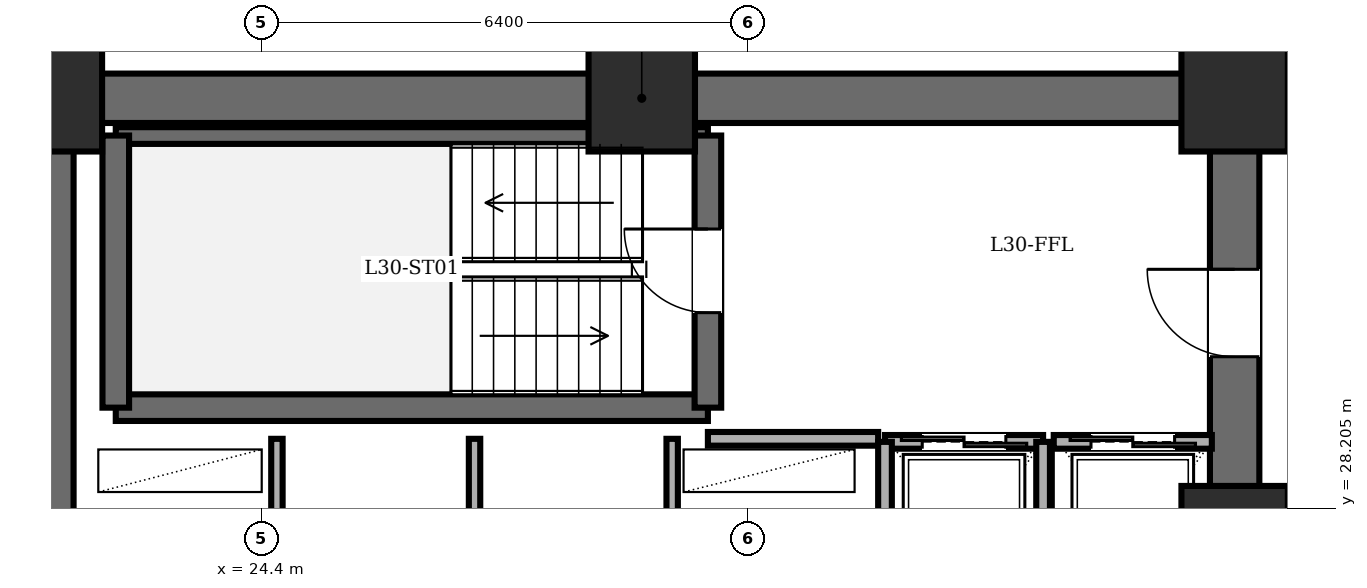
"""IFC4 building model, lengths in metres.
Left out: names, types, materials, properties, quantities, classifications, styles, units other than length and angle.
Written with IfcOpenShell. Run it as: python <this file> out.ifc"""

import sys

from ifc_helpers import new_model, si_unit, direction, frame, frame_2d, origin, origin_2d, place, context, subcontext, project, spatial, rectangle, extrude, element, fill, save


model = new_model("IFC4")
c1 = context("Model", 3, precision=1e-05, world=origin(), true_north=direction((0.0, 1.0)))
c2 = subcontext(c1, "Body", "Model", "MODEL_VIEW")
j1 = project(units=[si_unit("LENGTHUNIT", "METRE"), si_unit("PLANEANGLEUNIT", "RADIAN")], contexts=[c1])
p1 = place(None, origin())
s1 = spatial("IfcSite", under=j1, at=p1, CompositionType="ELEMENT")
p2 = place(p1, origin())
s2 = spatial("IfcBuilding", under=s1, at=p2, CompositionType="ELEMENT")
p3 = place(p2, frame((0.0, 0.0, 115.1)))
s3 = spatial("IfcBuildingStorey", under=s2, at=p3, CompositionType="ELEMENT", Elevation=115.1)
for number, where, z_axis, x_axis in (
    (1, (37.2, 27.8, 0.0), (0.0, 0.0, 1.0), (1.0, 0.0, 0.0)),
    (2, (37.2, 33.6, 0.0), (0.0, 0.0, 1.0), (1.0, 0.0, 0.0)),
    (3, (29.4, 33.6, 0.0), (0.0, 0.0, 1.0), (1.0, 0.0, 0.0)),
    (4, (21.6, 33.6, 0.0), (0.0, 0.0, 1.0), (1.0, 0.0, 0.0)),
):
    element("IfcColumn", number, at=place(p3, frame(where, z_axis=z_axis, x_axis=x_axis)), inside=s3, PredefinedType="COLUMN", context=c2, shape_type="SweptSolid", body=[
        extrude(rectangle(XDim=1.4, YDim=1.4, at=origin_2d()), origin(), (0.0, 0.0, 1.0), 3.6),
    ])
p4 = place(p3, frame((21.6, 14.4, 0.0), z_axis=(0.0, 0.0, 1.0), x_axis=(0.0, 1.0, 0.0)))
e5 = element("IfcWall", 5, at=p4, inside=s3, PredefinedType="SHEAR", context=c2, shape_type="SweptSolid", body=[
    extrude(rectangle(XDim=19.2, YDim=0.65, at=frame_2d((9.6, 0.0))), origin(), (0.0, 0.0, 1.0), 3.4),
])
p5 = place(p3, frame((21.6, 33.6, 0.0), z_axis=(0.0, 0.0, 1.0), x_axis=(1.0, 0.0, 0.0)))
e6 = element("IfcWall", 6, at=p5, inside=s3, PredefinedType="SHEAR", context=c2, shape_type="SweptSolid", body=[
    extrude(rectangle(XDim=15.6, YDim=0.65, at=frame_2d((7.8, 0.0))), origin(), (0.0, 0.0, 1.0), 3.4),
])
p6 = place(p3, frame((37.2, 14.4, 0.0), z_axis=(0.0, 0.0, 1.0), x_axis=(0.0, 1.0, 0.0)))
e7 = element("IfcWall", 7, at=p6, inside=s3, PredefinedType="SHEAR", context=c2, shape_type="SweptSolid", body=[
    extrude(rectangle(XDim=19.2, YDim=0.65, at=frame_2d((9.6, 0.0))), origin(), (0.0, 0.0, 1.0), 3.4),
])
p7 = place(p6, frame((15.8, 0.0, 0.0)))
e8 = element("IfcOpeningElement", 8, at=p7, cuts=e7, PredefinedType="OPENING", context=c2, shape_type="SweptSolid", body=[
    extrude(rectangle(XDim=1.15, YDim=2.15, at=frame_2d((0.575, 1.075))), frame((0.0, 0.335, 0.0), z_axis=(0.0, -1.0, 0.0), x_axis=(1.0, 0.0, 0.0)), (0.0, 0.0, 1.0), 0.67),
])
p8 = place(p6, frame((3.6, 0.0, 0.0)))
e9 = element("IfcOpeningElement", 9, at=p8, cuts=e7, PredefinedType="OPENING", context=c2, shape_type="SweptSolid", body=[
    extrude(rectangle(XDim=1.1, YDim=2.15, at=frame_2d((0.55, 1.075))), frame((0.0, 0.335, 0.0), z_axis=(0.0, -1.0, 0.0), x_axis=(1.0, 0.0, 0.0)), (0.0, 0.0, 1.0), 0.67),
])
p9 = place(p6, frame((8.6, 0.0, 0.0)))
e10 = element("IfcOpeningElement", 10, at=p9, cuts=e7, PredefinedType="OPENING", context=c2, shape_type="SweptSolid", body=[
    extrude(rectangle(XDim=1.3, YDim=2.2, at=frame_2d((0.65, 1.1))), frame((0.0, 0.335, 0.0), z_axis=(0.0, -1.0, 0.0), x_axis=(1.0, 0.0, 0.0)), (0.0, 0.0, 1.0), 0.67),
])
p10 = place(p3, frame((22.48, 29.53, 0.0), z_axis=(0.0, 0.0, 1.0), x_axis=(1.0, 0.0, 0.0)))
e11 = element("IfcWall", 11, at=p10, inside=s3, PredefinedType="SOLIDWALL", context=c2, shape_type="SweptSolid", body=[
    extrude(rectangle(XDim=7.79, YDim=0.35, at=frame_2d((3.895, 0.0))), origin(), (0.0, 0.0, 1.0), 3.4),
])
p11 = place(p3, frame((22.48, 33.11, 0.0), z_axis=(0.0, 0.0, 1.0), x_axis=(1.0, 0.0, 0.0)))
e12 = element("IfcWall", 12, at=p11, inside=s3, PredefinedType="PARTITIONING", context=c2, shape_type="SweptSolid", body=[
    extrude(rectangle(XDim=7.79, YDim=0.22, at=frame_2d((3.895, 0.0))), origin(), (0.0, 0.0, 1.0), 3.4),
])
p12 = place(p3, frame((22.48, 29.53, 0.0), z_axis=(0.0, 0.0, 1.0), x_axis=(0.0, 1.0, 0.0)))
e13 = element("IfcWall", 13, at=p12, inside=s3, PredefinedType="SOLIDWALL", context=c2, shape_type="SweptSolid", body=[
    extrude(rectangle(XDim=3.58, YDim=0.35, at=frame_2d((1.79, 0.0))), origin(), (0.0, 0.0, 1.0), 3.4),
])
p13 = place(p3, frame((30.27, 29.53, 0.0), z_axis=(0.0, 0.0, 1.0), x_axis=(0.0, 1.0, 0.0)))
e14 = element("IfcWall", 14, at=p13, inside=s3, PredefinedType="SOLIDWALL", context=c2, shape_type="SweptSolid", body=[
    extrude(rectangle(XDim=3.58, YDim=0.35, at=frame_2d((1.79, 0.0))), origin(), (0.0, 0.0, 1.0), 3.4),
])
p14 = place(p13, frame((1.25, 0.0, 0.0)))
e15 = element("IfcOpeningElement", 15, at=p14, cuts=e14, PredefinedType="OPENING", context=c2, shape_type="SweptSolid", body=[
    extrude(rectangle(XDim=1.1, YDim=2.15, at=frame_2d((0.55, 1.075))), frame((0.0, 0.185, 0.0), z_axis=(0.0, -1.0, 0.0), x_axis=(1.0, 0.0, 0.0)), (0.0, 0.0, 1.0), 0.37),
])
p15 = place(p3, frame((30.27, 29.12, 0.0), z_axis=(0.0, 0.0, 1.0), x_axis=(1.0, 0.0, 0.0)))
e16 = element("IfcWall", 16, at=p15, inside=s3, PredefinedType="PARTITIONING", context=c2, shape_type="SweptSolid", body=[
    extrude(rectangle(XDim=2.24, YDim=0.18, at=frame_2d((1.12, 0.0))), origin(), (0.0, 0.0, 1.0), 3.4),
])
for number, where, z_axis, x_axis in (
    (17, (24.6, 27.6, 0.0), (0.0, 0.0, 1.0), (0.0, 1.0, 0.0)),
    (18, (27.2, 27.6, 0.0), (0.0, 0.0, 1.0), (0.0, 1.0, 0.0)),
    (19, (29.8, 27.6, 0.0), (0.0, 0.0, 1.0), (0.0, 1.0, 0.0)),
):
    element("IfcWall", number, at=place(p3, frame(where, z_axis=z_axis, x_axis=x_axis)), inside=s3, PredefinedType="PARTITIONING", context=c2, shape_type="SweptSolid", body=[
        extrude(rectangle(XDim=1.52, YDim=0.15, at=frame_2d((0.76, 0.0))), origin(), (0.0, 0.0, 1.0), 3.4),
    ])
p16 = place(p3, frame((32.6, 29.08, 0.0), z_axis=(0.0, 0.0, 1.0), x_axis=(1.0, 0.0, 0.0)))
e20 = element("IfcWall", 20, at=p16, inside=s3, PredefinedType="PARTITIONING", context=c2, shape_type="SweptSolid", body=[
    extrude(rectangle(XDim=2.08, YDim=0.18, at=frame_2d((1.04, 0.0))), origin(), (0.0, 0.0, 1.0), 3.4),
])
p17 = place(p16, frame((0.49, 0.0, 0.0)))
e21 = element("IfcOpeningElement", 21, at=p17, cuts=e20, PredefinedType="OPENING", context=c2, shape_type="SweptSolid", body=[
    extrude(rectangle(XDim=1.1, YDim=2.2, at=frame_2d((0.55, 1.1))), frame((0.0, 0.1, 0.0), z_axis=(0.0, -1.0, 0.0), x_axis=(1.0, 0.0, 0.0)), (0.0, 0.0, 1.0), 0.2),
])
for number, where, z_axis, x_axis in (
    (22, (34.68, 26.35, 0.0), (0.0, 0.0, 1.0), (0.0, 1.0, 0.0)),
    (23, (32.6, 29.08, 0.0), (0.0, 0.0, 1.0), (0.0, -1.0, 0.0)),
):
    element("IfcWall", number, at=place(p3, frame(where, z_axis=z_axis, x_axis=x_axis)), inside=s3, PredefinedType="PARTITIONING", context=c2, shape_type="SweptSolid", body=[
        extrude(rectangle(XDim=2.73, YDim=0.18, at=frame_2d((1.365, 0.0))), origin(), (0.0, 0.0, 1.0), 3.4),
    ])
p18 = place(p3, frame((34.82, 29.08, 0.0), z_axis=(0.0, 0.0, 1.0), x_axis=(1.0, 0.0, 0.0)))
e24 = element("IfcWall", 24, at=p18, inside=s3, PredefinedType="PARTITIONING", context=c2, shape_type="SweptSolid", body=[
    extrude(rectangle(XDim=2.08, YDim=0.18, at=frame_2d((1.04, 0.0))), origin(), (0.0, 0.0, 1.0), 3.4),
])
p19 = place(p18, frame((0.49, 0.0, 0.0)))
e25 = element("IfcOpeningElement", 25, at=p19, cuts=e24, PredefinedType="OPENING", context=c2, shape_type="SweptSolid", body=[
    extrude(rectangle(XDim=1.1, YDim=2.2, at=frame_2d((0.55, 1.1))), frame((0.0, 0.1, 0.0), z_axis=(0.0, -1.0, 0.0), x_axis=(1.0, 0.0, 0.0)), (0.0, 0.0, 1.0), 0.2),
])
p20 = place(p14, origin())
e26 = element("IfcDoor", 26, at=p20, inside=s3, OperationType="SINGLE_SWING_RIGHT", PredefinedType="DOOR", context=c2, shape_type="SweptSolid", body=[
    extrude(rectangle(XDim=1.1, YDim=2.15, at=frame_2d((0.55, 1.075))), frame((0.0, 0.025, 0.0), z_axis=(0.0, -1.0, 0.0), x_axis=(1.0, 0.0, 0.0)), (0.0, 0.0, 1.0), 0.05),
])
fill(e15, e26)
p21 = place(p7, origin())
e27 = element("IfcDoor", 27, at=p21, inside=s3, OperationType="SINGLE_SWING_RIGHT", PredefinedType="DOOR", context=c2, shape_type="SweptSolid", body=[
    extrude(rectangle(XDim=1.15, YDim=2.15, at=frame_2d((0.575, 1.075))), frame((0.0, 0.025, 0.0), z_axis=(0.0, -1.0, 0.0), x_axis=(1.0, 0.0, 0.0)), (0.0, 0.0, 1.0), 0.05),
])
fill(e8, e27)
p22 = place(p17, origin())
e28 = element("IfcDoor", 28, at=p22, inside=s3, OperationType="DOUBLE_DOOR_SLIDING", PredefinedType="DOOR", context=c2, shape_type="SweptSolid", body=[
    extrude(rectangle(XDim=1.1, YDim=2.2, at=frame_2d((0.55, 1.1))), frame((0.0, 0.025, 0.0), z_axis=(0.0, -1.0, 0.0), x_axis=(1.0, 0.0, 0.0)), (0.0, 0.0, 1.0), 0.05),
])
fill(e21, e28)
p23 = place(p19, origin())
e29 = element("IfcDoor", 29, at=p23, inside=s3, OperationType="DOUBLE_DOOR_SLIDING", PredefinedType="DOOR", context=c2, shape_type="SweptSolid", body=[
    extrude(rectangle(XDim=1.1, YDim=2.2, at=frame_2d((0.55, 1.1))), frame((0.0, 0.025, 0.0), z_axis=(0.0, -1.0, 0.0), x_axis=(1.0, 0.0, 0.0)), (0.0, 0.0, 1.0), 0.05),
])
fill(e25, e29)
save(model, sys.argv[1])
